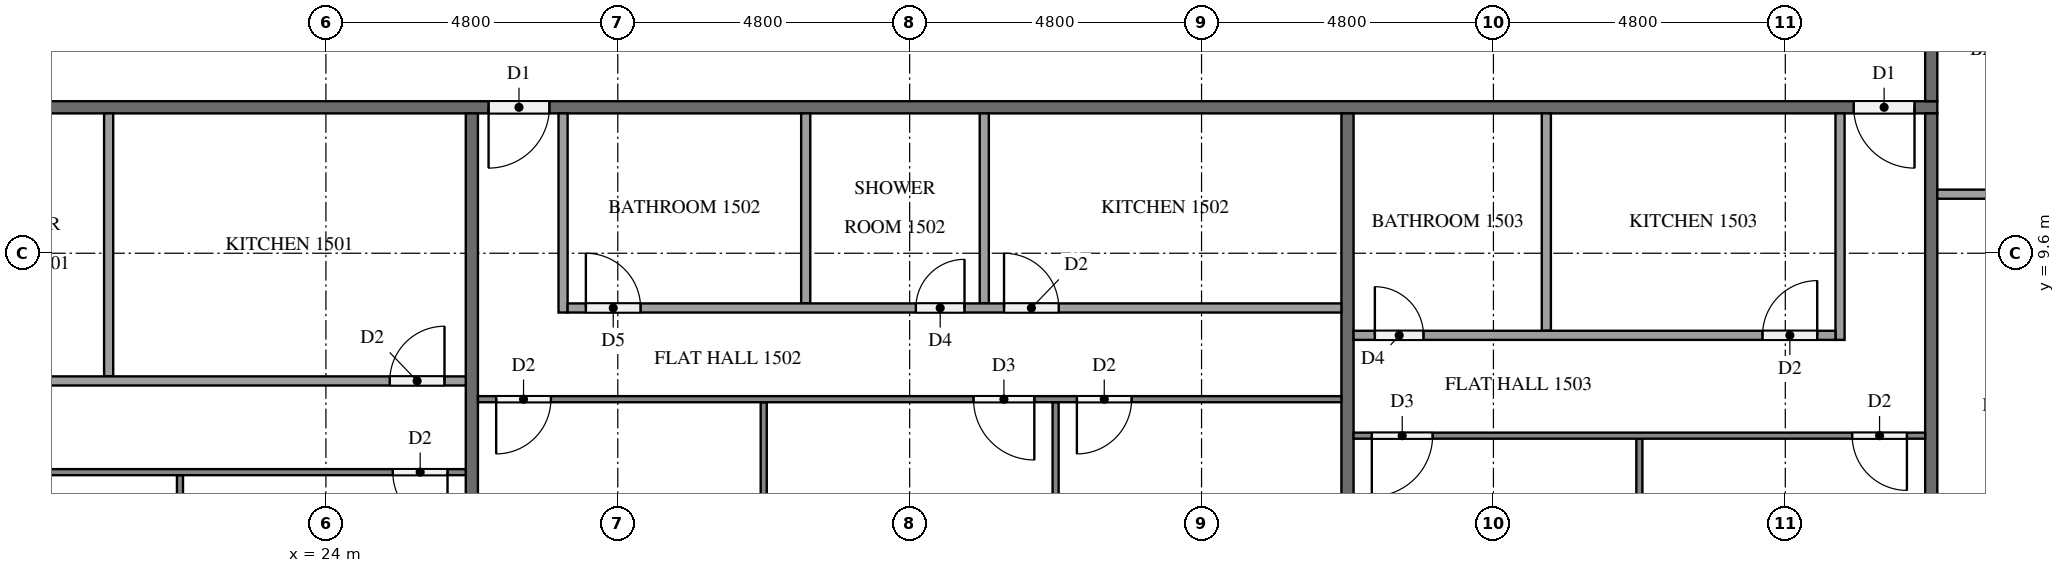
"""IFC4 building model, lengths in metres.
Left out: names, types, materials, properties, quantities, classifications, styles, units other than length and angle.
Written with IfcOpenShell. Run it as: python <this file> out.ifc"""

import sys

from ifc_helpers import new_model, si_unit, direction, frame, frame_2d, origin, place, context, subcontext, project, spatial, rectangle, extrude, element, fill, save


model = new_model("IFC4")
c1 = context("Model", 3, precision=1e-05, world=origin(), true_north=direction((0.0, 1.0)))
c2 = subcontext(c1, "Body", "Model", "MODEL_VIEW")
j1 = project(units=[si_unit("LENGTHUNIT", "METRE"), si_unit("PLANEANGLEUNIT", "RADIAN")], contexts=[c1])
p1 = place(None, origin())
s1 = spatial("IfcSite", under=j1, at=p1, CompositionType="ELEMENT")
p2 = place(p1, origin())
s2 = spatial("IfcBuilding", under=s1, at=p2, CompositionType="ELEMENT")
p3 = place(p2, frame((0.0, 0.0, 62.8)))
s3 = spatial("IfcBuildingStorey", under=s2, at=p3, CompositionType="ELEMENT", Elevation=62.8)
p4 = place(p3, frame((50.5, 12.0, 0.0), z_axis=(0.0, 0.0, 1.0), x_axis=(-1.0, 0.0, 0.0)))
e1 = element("IfcWall", 1, at=p4, inside=s3, PredefinedType="PARTITIONING", context=c2, shape_type="SweptSolid", body=[
    extrude(rectangle(XDim=38.6, YDim=0.2, at=frame_2d((19.3, 0.0))), origin(), (0.0, 0.0, 1.0), 3.2),
])
p5 = place(p4, frame((37.225, 0.0, 0.0)))
e2 = element("IfcOpeningElement", 2, at=p5, cuts=e1, PredefinedType="OPENING", context=c2, shape_type="SweptSolid", body=[
    extrude(rectangle(XDim=1.0, YDim=2.1, at=frame_2d((0.5, 1.05))), frame((0.0, 0.11, 0.0), z_axis=(0.0, -1.0, 0.0), x_axis=(1.0, 0.0, 0.0)), (0.0, 0.0, 1.0), 0.22),
])
p6 = place(p4, frame((22.825, 0.0, 0.0)))
e3 = element("IfcOpeningElement", 3, at=p6, cuts=e1, PredefinedType="OPENING", context=c2, shape_type="SweptSolid", body=[
    extrude(rectangle(XDim=1.0, YDim=2.1, at=frame_2d((0.5, 1.05))), frame((0.0, 0.11, 0.0), z_axis=(0.0, -1.0, 0.0), x_axis=(1.0, 0.0, 0.0)), (0.0, 0.0, 1.0), 0.22),
])
p7 = place(p4, frame((0.375, 0.0, 0.0)))
e4 = element("IfcOpeningElement", 4, at=p7, cuts=e1, PredefinedType="OPENING", context=c2, shape_type="SweptSolid", body=[
    extrude(rectangle(XDim=1.0, YDim=2.1, at=frame_2d((0.5, 1.05))), frame((0.0, 0.11, 0.0), z_axis=(0.0, -1.0, 0.0), x_axis=(1.0, 0.0, 0.0)), (0.0, 0.0, 1.0), 0.22),
])
p8 = place(p3, frame((50.4, 40.7, 0.0), z_axis=(0.0, 0.0, 1.0), x_axis=(0.0, -1.0, 0.0)))
e5 = element("IfcWall", 5, at=p8, inside=s3, PredefinedType="PARTITIONING", context=c2, shape_type="SweptSolid", body=[
    extrude(rectangle(XDim=28.6, YDim=0.2, at=frame_2d((14.3, 0.0))), origin(), (0.0, 0.0, 1.0), 3.2),
])
p9 = place(p8, frame((24.175, 0.0, 0.0)))
e6 = element("IfcOpeningElement", 6, at=p9, cuts=e5, PredefinedType="OPENING", context=c2, shape_type="SweptSolid", body=[
    extrude(rectangle(XDim=1.0, YDim=2.1, at=frame_2d((0.5, 1.05))), frame((0.0, 0.11, 0.0), z_axis=(0.0, -1.0, 0.0), x_axis=(1.0, 0.0, 0.0)), (0.0, 0.0, 1.0), 0.22),
])
p10 = place(p8, frame((22.625, 0.0, 0.0)))
e7 = element("IfcOpeningElement", 7, at=p10, cuts=e5, PredefinedType="OPENING", context=c2, shape_type="SweptSolid", body=[
    extrude(rectangle(XDim=1.0, YDim=2.1, at=frame_2d((0.5, 1.05))), frame((0.0, 0.11, 0.0), z_axis=(0.0, -1.0, 0.0), x_axis=(1.0, 0.0, 0.0)), (0.0, 0.0, 1.0), 0.22),
])
p11 = place(p8, frame((10.625, 0.0, 0.0)))
e8 = element("IfcOpeningElement", 8, at=p11, cuts=e5, PredefinedType="OPENING", context=c2, shape_type="SweptSolid", body=[
    extrude(rectangle(XDim=1.0, YDim=2.1, at=frame_2d((0.5, 1.05))), frame((0.0, 0.11, 0.0), z_axis=(0.0, -1.0, 0.0), x_axis=(1.0, 0.0, 0.0)), (0.0, 0.0, 1.0), 0.22),
])
for number, where, z_axis, x_axis in (
    (9, (26.4, 11.9, 0.0), (0.0, 0.0, 1.0), (0.0, -1.0, 0.0)),
    (10, (40.8, 11.9, 0.0), (0.0, 0.0, 1.0), (0.0, -1.0, 0.0)),
    (11, (50.4, 11.9, 0.0), (0.0, 0.0, 1.0), (0.0, -1.0, 0.0)),
):
    element("IfcWall", number, at=place(p3, frame(where, z_axis=z_axis, x_axis=x_axis)), inside=s3, PredefinedType="PARTITIONING", context=c2, shape_type="SweptSolid", body=[
        extrude(rectangle(XDim=11.8, YDim=0.2, at=frame_2d((5.9, 0.0))), origin(), (0.0, 0.0, 1.0), 3.2),
    ])
p12 = place(p3, frame((21.6, 5.95, 0.0), z_axis=(0.0, 0.0, 1.0), x_axis=(0.0, -1.0, 0.0)))
e12 = element("IfcWall", 12, at=p12, inside=s3, PredefinedType="PARTITIONING", context=c2, shape_type="SweptSolid", body=[
    extrude(rectangle(XDim=5.85, YDim=0.1, at=frame_2d((2.925, 0.0))), origin(), (0.0, 0.0, 1.0), 3.2),
])
p13 = place(p3, frame((26.3, 6.0, 0.0), z_axis=(0.0, 0.0, 1.0), x_axis=(-1.0, 0.0, 0.0)))
e13 = element("IfcWall", 13, at=p13, inside=s3, PredefinedType="PARTITIONING", context=c2, shape_type="SweptSolid", body=[
    extrude(rectangle(XDim=14.2, YDim=0.1, at=frame_2d((7.1, 0.0))), origin(), (0.0, 0.0, 1.0), 3.2),
])
p14 = place(p13, frame((9.85, 0.0, 0.0)))
e14 = element("IfcOpeningElement", 14, at=p14, cuts=e13, PredefinedType="OPENING", context=c2, shape_type="SweptSolid", body=[
    extrude(rectangle(XDim=0.9, YDim=2.1, at=frame_2d((0.45, 1.05))), frame((0.0, 0.06, 0.0), z_axis=(0.0, -1.0, 0.0), x_axis=(1.0, 0.0, 0.0)), (0.0, 0.0, 1.0), 0.12),
])
p15 = place(p13, frame((8.15, 0.0, 0.0)))
e15 = element("IfcOpeningElement", 15, at=p15, cuts=e13, PredefinedType="OPENING", context=c2, shape_type="SweptSolid", body=[
    extrude(rectangle(XDim=1.0, YDim=2.1, at=frame_2d((0.5, 1.05))), frame((0.0, 0.06, 0.0), z_axis=(0.0, -1.0, 0.0), x_axis=(1.0, 0.0, 0.0)), (0.0, 0.0, 1.0), 0.12),
])
p16 = place(p13, frame((0.3, 0.0, 0.0)))
e16 = element("IfcOpeningElement", 16, at=p16, cuts=e13, PredefinedType="OPENING", context=c2, shape_type="SweptSolid", body=[
    extrude(rectangle(XDim=0.9, YDim=2.1, at=frame_2d((0.45, 1.05))), frame((0.0, 0.06, 0.0), z_axis=(0.0, -1.0, 0.0), x_axis=(1.0, 0.0, 0.0)), (0.0, 0.0, 1.0), 0.12),
])
p17 = place(p3, frame((20.427, 11.9, 0.0), z_axis=(0.0, 0.0, 1.0), x_axis=(0.0, -1.0, 0.0)))
e17 = element("IfcWall", 17, at=p17, inside=s3, PredefinedType="PARTITIONING", context=c2, shape_type="SweptSolid", body=[
    extrude(rectangle(XDim=4.325, YDim=0.15, at=frame_2d((2.163, 0.0))), origin(), (0.0, 0.0, 1.0), 3.2),
])
p18 = place(p3, frame((13.575, 7.5, 0.0), z_axis=(0.0, 0.0, 1.0), x_axis=(1.0, 0.0, 0.0)))
e18 = element("IfcWall", 18, at=p18, inside=s3, PredefinedType="PARTITIONING", context=c2, shape_type="SweptSolid", body=[
    extrude(rectangle(XDim=12.725, YDim=0.15, at=frame_2d((6.363, 0.0))), origin(), (0.0, 0.0, 1.0), 3.2),
])
p19 = place(p18, frame((2.69, 0.0, 0.0)))
e19 = element("IfcOpeningElement", 19, at=p19, cuts=e18, PredefinedType="OPENING", context=c2, shape_type="SweptSolid", body=[
    extrude(rectangle(XDim=0.9, YDim=2.1, at=frame_2d((0.45, 1.05))), frame((0.0, 0.085, 0.0), z_axis=(0.0, -1.0, 0.0), x_axis=(1.0, 0.0, 0.0)), (0.0, 0.0, 1.0), 0.17),
])
p20 = place(p18, frame((4.24, 0.0, 0.0)))
e20 = element("IfcOpeningElement", 20, at=p20, cuts=e18, PredefinedType="OPENING", context=c2, shape_type="SweptSolid", body=[
    extrude(rectangle(XDim=0.8, YDim=2.1, at=frame_2d((0.4, 1.05))), frame((0.0, 0.085, 0.0), z_axis=(0.0, -1.0, 0.0), x_axis=(1.0, 0.0, 0.0)), (0.0, 0.0, 1.0), 0.17),
])
p21 = place(p18, frame((11.475, 0.0, 0.0)))
e21 = element("IfcOpeningElement", 21, at=p21, cuts=e18, PredefinedType="OPENING", context=c2, shape_type="SweptSolid", body=[
    extrude(rectangle(XDim=0.9, YDim=2.1, at=frame_2d((0.45, 1.05))), frame((0.0, 0.085, 0.0), z_axis=(0.0, -1.0, 0.0), x_axis=(1.0, 0.0, 0.0)), (0.0, 0.0, 1.0), 0.17),
])
for number, where, z_axis, x_axis in (
    (22, (31.2, 7.15, 0.0), (0.0, 0.0, 1.0), (0.0, -1.0, 0.0)),
    (23, (36.0, 7.15, 0.0), (0.0, 0.0, 1.0), (0.0, -1.0, 0.0)),
):
    element("IfcWall", number, at=place(p3, frame(where, z_axis=z_axis, x_axis=x_axis)), inside=s3, PredefinedType="PARTITIONING", context=c2, shape_type="SweptSolid", body=[
        extrude(rectangle(XDim=7.05, YDim=0.1, at=frame_2d((3.525, 0.0))), origin(), (0.0, 0.0, 1.0), 3.2),
    ])
p22 = place(p3, frame((40.7, 7.2, 0.0), z_axis=(0.0, 0.0, 1.0), x_axis=(-1.0, 0.0, 0.0)))
e24 = element("IfcWall", 24, at=p22, inside=s3, PredefinedType="PARTITIONING", context=c2, shape_type="SweptSolid", body=[
    extrude(rectangle(XDim=14.2, YDim=0.1, at=frame_2d((7.1, 0.0))), origin(), (0.0, 0.0, 1.0), 3.2),
])
p23 = place(p22, frame((13.0, 0.0, 0.0)))
e25 = element("IfcOpeningElement", 25, at=p23, cuts=e24, PredefinedType="OPENING", context=c2, shape_type="SweptSolid", body=[
    extrude(rectangle(XDim=0.9, YDim=2.1, at=frame_2d((0.45, 1.05))), frame((0.0, 0.06, 0.0), z_axis=(0.0, -1.0, 0.0), x_axis=(1.0, 0.0, 0.0)), (0.0, 0.0, 1.0), 0.12),
])
p24 = place(p22, frame((5.05, 0.0, 0.0)))
e26 = element("IfcOpeningElement", 26, at=p24, cuts=e24, PredefinedType="OPENING", context=c2, shape_type="SweptSolid", body=[
    extrude(rectangle(XDim=1.0, YDim=2.1, at=frame_2d((0.5, 1.05))), frame((0.0, 0.06, 0.0), z_axis=(0.0, -1.0, 0.0), x_axis=(1.0, 0.0, 0.0)), (0.0, 0.0, 1.0), 0.12),
])
p25 = place(p22, frame((3.45, 0.0, 0.0)))
e27 = element("IfcOpeningElement", 27, at=p25, cuts=e24, PredefinedType="OPENING", context=c2, shape_type="SweptSolid", body=[
    extrude(rectangle(XDim=0.9, YDim=2.1, at=frame_2d((0.45, 1.05))), frame((0.0, 0.06, 0.0), z_axis=(0.0, -1.0, 0.0), x_axis=(1.0, 0.0, 0.0)), (0.0, 0.0, 1.0), 0.12),
])
for number, where, z_axis, x_axis in (
    (28, (31.89, 11.9, 0.0), (0.0, 0.0, 1.0), (0.0, -1.0, 0.0)),
    (29, (34.827, 11.9, 0.0), (0.0, 0.0, 1.0), (0.0, -1.0, 0.0)),
):
    element("IfcWall", number, at=place(p3, frame(where, z_axis=z_axis, x_axis=x_axis)), inside=s3, PredefinedType="PARTITIONING", context=c2, shape_type="SweptSolid", body=[
        extrude(rectangle(XDim=3.125, YDim=0.15, at=frame_2d((1.562, 0.0))), origin(), (0.0, 0.0, 1.0), 3.2),
    ])
p26 = place(p3, frame((27.9, 11.9, 0.0), z_axis=(0.0, 0.0, 1.0), x_axis=(0.0, -1.0, 0.0)))
e30 = element("IfcWall", 30, at=p26, inside=s3, PredefinedType="PARTITIONING", context=c2, shape_type="SweptSolid", body=[
    extrude(rectangle(XDim=3.275, YDim=0.15, at=frame_2d((1.637, 0.0))), origin(), (0.0, 0.0, 1.0), 3.2),
])
p27 = place(p3, frame((27.975, 8.7, 0.0), z_axis=(0.0, 0.0, 1.0), x_axis=(1.0, 0.0, 0.0)))
e31 = element("IfcWall", 31, at=p27, inside=s3, PredefinedType="PARTITIONING", context=c2, shape_type="SweptSolid", body=[
    extrude(rectangle(XDim=12.725, YDim=0.15, at=frame_2d((6.362, 0.0))), origin(), (0.0, 0.0, 1.0), 3.2),
])
p28 = place(p27, frame((0.3, 0.0, 0.0)))
e32 = element("IfcOpeningElement", 32, at=p28, cuts=e31, PredefinedType="OPENING", context=c2, shape_type="SweptSolid", body=[
    extrude(rectangle(XDim=0.9, YDim=2.1, at=frame_2d((0.45, 1.05))), frame((0.0, 0.085, 0.0), z_axis=(0.0, -1.0, 0.0), x_axis=(1.0, 0.0, 0.0)), (0.0, 0.0, 1.0), 0.17),
])
p29 = place(p27, frame((5.727, 0.0, 0.0)))
e33 = element("IfcOpeningElement", 33, at=p29, cuts=e31, PredefinedType="OPENING", context=c2, shape_type="SweptSolid", body=[
    extrude(rectangle(XDim=0.8, YDim=2.1, at=frame_2d((0.4, 1.05))), frame((0.0, 0.085, 0.0), z_axis=(0.0, -1.0, 0.0), x_axis=(1.0, 0.0, 0.0)), (0.0, 0.0, 1.0), 0.17),
])
p30 = place(p27, frame((7.177, 0.0, 0.0)))
e34 = element("IfcOpeningElement", 34, at=p30, cuts=e31, PredefinedType="OPENING", context=c2, shape_type="SweptSolid", body=[
    extrude(rectangle(XDim=0.9, YDim=2.1, at=frame_2d((0.45, 1.05))), frame((0.0, 0.085, 0.0), z_axis=(0.0, -1.0, 0.0), x_axis=(1.0, 0.0, 0.0)), (0.0, 0.0, 1.0), 0.17),
])
p31 = place(p3, frame((45.6, 6.55, 0.0), z_axis=(0.0, 0.0, 1.0), x_axis=(0.0, -1.0, 0.0)))
e35 = element("IfcWall", 35, at=p31, inside=s3, PredefinedType="PARTITIONING", context=c2, shape_type="SweptSolid", body=[
    extrude(rectangle(XDim=6.45, YDim=0.1, at=frame_2d((3.225, 0.0))), origin(), (0.0, 0.0, 1.0), 3.2),
])
p32 = place(p3, frame((50.3, 6.6, 0.0), z_axis=(0.0, 0.0, 1.0), x_axis=(-1.0, 0.0, 0.0)))
e36 = element("IfcWall", 36, at=p32, inside=s3, PredefinedType="PARTITIONING", context=c2, shape_type="SweptSolid", body=[
    extrude(rectangle(XDim=9.4, YDim=0.1, at=frame_2d((4.7, 0.0))), origin(), (0.0, 0.0, 1.0), 3.2),
])
p33 = place(p32, frame((0.3, 0.0, 0.0)))
e37 = element("IfcOpeningElement", 37, at=p33, cuts=e36, PredefinedType="OPENING", context=c2, shape_type="SweptSolid", body=[
    extrude(rectangle(XDim=0.9, YDim=2.1, at=frame_2d((0.45, 1.05))), frame((0.0, 0.06, 0.0), z_axis=(0.0, -1.0, 0.0), x_axis=(1.0, 0.0, 0.0)), (0.0, 0.0, 1.0), 0.12),
])
p34 = place(p32, frame((8.1, 0.0, 0.0)))
e38 = element("IfcOpeningElement", 38, at=p34, cuts=e36, PredefinedType="OPENING", context=c2, shape_type="SweptSolid", body=[
    extrude(rectangle(XDim=1.0, YDim=2.1, at=frame_2d((0.5, 1.05))), frame((0.0, 0.06, 0.0), z_axis=(0.0, -1.0, 0.0), x_axis=(1.0, 0.0, 0.0)), (0.0, 0.0, 1.0), 0.12),
])
p35 = place(p3, frame((44.07, 11.9, 0.0), z_axis=(0.0, 0.0, 1.0), x_axis=(0.0, -1.0, 0.0)))
e39 = element("IfcWall", 39, at=p35, inside=s3, PredefinedType="PARTITIONING", context=c2, shape_type="SweptSolid", body=[
    extrude(rectangle(XDim=3.575, YDim=0.15, at=frame_2d((1.788, 0.0))), origin(), (0.0, 0.0, 1.0), 3.2),
])
p36 = place(p3, frame((48.9, 11.9, 0.0), z_axis=(0.0, 0.0, 1.0), x_axis=(0.0, -1.0, 0.0)))
e40 = element("IfcWall", 40, at=p36, inside=s3, PredefinedType="PARTITIONING", context=c2, shape_type="SweptSolid", body=[
    extrude(rectangle(XDim=3.725, YDim=0.15, at=frame_2d((1.862, 0.0))), origin(), (0.0, 0.0, 1.0), 3.2),
])
p37 = place(p3, frame((40.9, 8.25, 0.0), z_axis=(0.0, 0.0, 1.0), x_axis=(1.0, 0.0, 0.0)))
e41 = element("IfcWall", 41, at=p37, inside=s3, PredefinedType="PARTITIONING", context=c2, shape_type="SweptSolid", body=[
    extrude(rectangle(XDim=7.925, YDim=0.15, at=frame_2d((3.962, 0.0))), origin(), (0.0, 0.0, 1.0), 3.2),
])
p38 = place(p37, frame((6.725, 0.0, 0.0)))
e42 = element("IfcOpeningElement", 42, at=p38, cuts=e41, PredefinedType="OPENING", context=c2, shape_type="SweptSolid", body=[
    extrude(rectangle(XDim=0.9, YDim=2.1, at=frame_2d((0.45, 1.05))), frame((0.0, 0.085, 0.0), z_axis=(0.0, -1.0, 0.0), x_axis=(1.0, 0.0, 0.0)), (0.0, 0.0, 1.0), 0.17),
])
p39 = place(p37, frame((0.35, 0.0, 0.0)))
e43 = element("IfcOpeningElement", 43, at=p39, cuts=e41, PredefinedType="OPENING", context=c2, shape_type="SweptSolid", body=[
    extrude(rectangle(XDim=0.8, YDim=2.1, at=frame_2d((0.4, 1.05))), frame((0.0, 0.085, 0.0), z_axis=(0.0, -1.0, 0.0), x_axis=(1.0, 0.0, 0.0)), (0.0, 0.0, 1.0), 0.17),
])
p40 = place(p3, frame((50.5, 10.571, 0.0), z_axis=(0.0, 0.0, 1.0), x_axis=(1.0, 0.0, 0.0)))
e44 = element("IfcWall", 44, at=p40, inside=s3, PredefinedType="PARTITIONING", context=c2, shape_type="SweptSolid", body=[
    extrude(rectangle(XDim=3.575, YDim=0.15, at=frame_2d((1.788, 0.0))), origin(), (0.0, 0.0, 1.0), 3.2),
])
p41 = place(p6, origin())
e45 = element("IfcDoor", 45, at=p41, inside=s3, OperationType="SINGLE_SWING_RIGHT", PredefinedType="DOOR", context=c2, shape_type="SweptSolid", body=[
    extrude(rectangle(XDim=1.0, YDim=2.1, at=frame_2d((0.5, 1.05))), frame((0.0, 0.025, 0.0), z_axis=(0.0, -1.0, 0.0), x_axis=(1.0, 0.0, 0.0)), (0.0, 0.0, 1.0), 0.05),
])
fill(e3, e45)
p42 = place(p7, origin())
e46 = element("IfcDoor", 46, at=p42, inside=s3, OperationType="SINGLE_SWING_LEFT", PredefinedType="DOOR", context=c2, shape_type="SweptSolid", body=[
    extrude(rectangle(XDim=1.0, YDim=2.1, at=frame_2d((0.5, 1.05))), frame((0.0, 0.025, 0.0), z_axis=(0.0, -1.0, 0.0), x_axis=(1.0, 0.0, 0.0)), (0.0, 0.0, 1.0), 0.05),
])
fill(e4, e46)
p43 = place(p16, origin())
e47 = element("IfcDoor", 47, at=p43, inside=s3, OperationType="SINGLE_SWING_LEFT", PredefinedType="DOOR", context=c2, shape_type="SweptSolid", body=[
    extrude(rectangle(XDim=0.9, YDim=2.1, at=frame_2d((0.45, 1.05))), frame((0.0, 0.025, 0.0), z_axis=(0.0, -1.0, 0.0), x_axis=(1.0, 0.0, 0.0)), (0.0, 0.0, 1.0), 0.05),
])
fill(e16, e47)
p44 = place(p21, origin())
e48 = element("IfcDoor", 48, at=p44, inside=s3, OperationType="SINGLE_SWING_RIGHT", PredefinedType="DOOR", context=c2, shape_type="SweptSolid", body=[
    extrude(rectangle(XDim=0.9, YDim=2.1, at=frame_2d((0.45, 1.05))), frame((0.0, 0.025, 0.0), z_axis=(0.0, -1.0, 0.0), x_axis=(1.0, 0.0, 0.0)), (0.0, 0.0, 1.0), 0.05),
])
fill(e21, e48)
p45 = place(p23, origin())
e49 = element("IfcDoor", 49, at=p45, inside=s3, OperationType="SINGLE_SWING_RIGHT", PredefinedType="DOOR", context=c2, shape_type="SweptSolid", body=[
    extrude(rectangle(XDim=0.9, YDim=2.1, at=frame_2d((0.45, 1.05))), frame((0.0, 0.025, 0.0), z_axis=(0.0, -1.0, 0.0), x_axis=(1.0, 0.0, 0.0)), (0.0, 0.0, 1.0), 0.05),
])
fill(e25, e49)
p46 = place(p24, origin())
e50 = element("IfcDoor", 50, at=p46, inside=s3, OperationType="SINGLE_SWING_LEFT", PredefinedType="DOOR", context=c2, shape_type="SweptSolid", body=[
    extrude(rectangle(XDim=1.0, YDim=2.1, at=frame_2d((0.5, 1.05))), frame((0.0, 0.025, 0.0), z_axis=(0.0, -1.0, 0.0), x_axis=(1.0, 0.0, 0.0)), (0.0, 0.0, 1.0), 0.05),
])
fill(e26, e50)
p47 = place(p25, origin())
e51 = element("IfcDoor", 51, at=p47, inside=s3, OperationType="SINGLE_SWING_RIGHT", PredefinedType="DOOR", context=c2, shape_type="SweptSolid", body=[
    extrude(rectangle(XDim=0.9, YDim=2.1, at=frame_2d((0.45, 1.05))), frame((0.0, 0.025, 0.0), z_axis=(0.0, -1.0, 0.0), x_axis=(1.0, 0.0, 0.0)), (0.0, 0.0, 1.0), 0.05),
])
fill(e27, e51)
p48 = place(p28, origin())
e52 = element("IfcDoor", 52, at=p48, inside=s3, OperationType="SINGLE_SWING_LEFT", PredefinedType="DOOR", context=c2, shape_type="SweptSolid", body=[
    extrude(rectangle(XDim=0.9, YDim=2.1, at=frame_2d((0.45, 1.05))), frame((0.0, 0.025, 0.0), z_axis=(0.0, -1.0, 0.0), x_axis=(1.0, 0.0, 0.0)), (0.0, 0.0, 1.0), 0.05),
])
fill(e32, e52)
p49 = place(p29, origin())
e53 = element("IfcDoor", 53, at=p49, inside=s3, OperationType="SINGLE_SWING_RIGHT", PredefinedType="DOOR", context=c2, shape_type="SweptSolid", body=[
    extrude(rectangle(XDim=0.8, YDim=2.1, at=frame_2d((0.4, 1.05))), frame((0.0, 0.025, 0.0), z_axis=(0.0, -1.0, 0.0), x_axis=(1.0, 0.0, 0.0)), (0.0, 0.0, 1.0), 0.05),
])
fill(e33, e53)
p50 = place(p30, origin())
e54 = element("IfcDoor", 54, at=p50, inside=s3, OperationType="SINGLE_SWING_LEFT", PredefinedType="DOOR", context=c2, shape_type="SweptSolid", body=[
    extrude(rectangle(XDim=0.9, YDim=2.1, at=frame_2d((0.45, 1.05))), frame((0.0, 0.025, 0.0), z_axis=(0.0, -1.0, 0.0), x_axis=(1.0, 0.0, 0.0)), (0.0, 0.0, 1.0), 0.05),
])
fill(e34, e54)
p51 = place(p33, origin())
e55 = element("IfcDoor", 55, at=p51, inside=s3, OperationType="SINGLE_SWING_LEFT", PredefinedType="DOOR", context=c2, shape_type="SweptSolid", body=[
    extrude(rectangle(XDim=0.9, YDim=2.1, at=frame_2d((0.45, 1.05))), frame((0.0, 0.025, 0.0), z_axis=(0.0, -1.0, 0.0), x_axis=(1.0, 0.0, 0.0)), (0.0, 0.0, 1.0), 0.05),
])
fill(e37, e55)
p52 = place(p34, origin())
e56 = element("IfcDoor", 56, at=p52, inside=s3, OperationType="SINGLE_SWING_RIGHT", PredefinedType="DOOR", context=c2, shape_type="SweptSolid", body=[
    extrude(rectangle(XDim=1.0, YDim=2.1, at=frame_2d((0.5, 1.05))), frame((0.0, 0.025, 0.0), z_axis=(0.0, -1.0, 0.0), x_axis=(1.0, 0.0, 0.0)), (0.0, 0.0, 1.0), 0.05),
])
fill(e38, e56)
p53 = place(p38, origin())
e57 = element("IfcDoor", 57, at=p53, inside=s3, OperationType="SINGLE_SWING_RIGHT", PredefinedType="DOOR", context=c2, shape_type="SweptSolid", body=[
    extrude(rectangle(XDim=0.9, YDim=2.1, at=frame_2d((0.45, 1.05))), frame((0.0, 0.025, 0.0), z_axis=(0.0, -1.0, 0.0), x_axis=(1.0, 0.0, 0.0)), (0.0, 0.0, 1.0), 0.05),
])
fill(e42, e57)
p54 = place(p39, origin())
e58 = element("IfcDoor", 58, at=p54, inside=s3, OperationType="SINGLE_SWING_LEFT", PredefinedType="DOOR", context=c2, shape_type="SweptSolid", body=[
    extrude(rectangle(XDim=0.8, YDim=2.1, at=frame_2d((0.4, 1.05))), frame((0.0, 0.025, 0.0), z_axis=(0.0, -1.0, 0.0), x_axis=(1.0, 0.0, 0.0)), (0.0, 0.0, 1.0), 0.05),
])
fill(e43, e58)
save(model, sys.argv[1])
